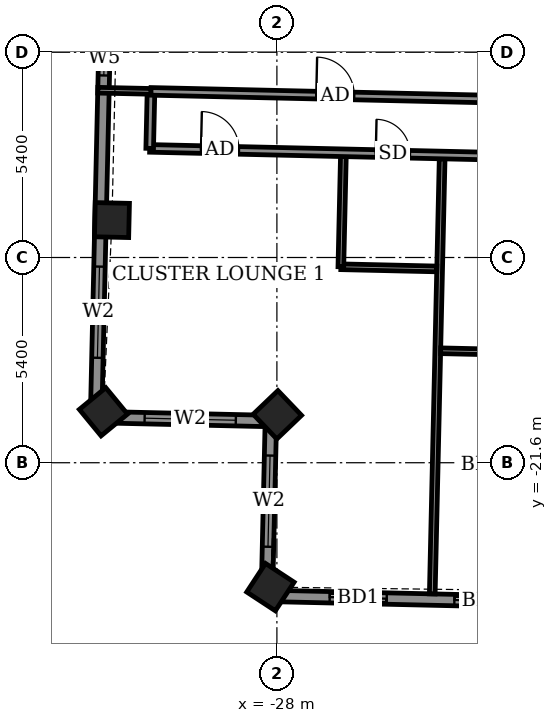
"""IFC4 building model, lengths in metres.
Left out: names, types, materials, properties, quantities, classifications, styles, units other than length and angle.
Written with IfcOpenShell. Run it as: python <this file> out.ifc"""

import sys

from ifc_helpers import new_model, si_unit, direction, frame, frame_2d, origin, origin_2d, place, context, subcontext, project, spatial, rectangle, extrude, element, fill, save


model = new_model("IFC4")
c1 = context("Model", 3, precision=1e-05, world=origin(), true_north=direction((0.0, 1.0)))
c2 = subcontext(c1, "Body", "Model", "MODEL_VIEW")
j1 = project(units=[si_unit("LENGTHUNIT", "METRE"), si_unit("PLANEANGLEUNIT", "RADIAN")], contexts=[c1])
p1 = place(None, origin())
s1 = spatial("IfcSite", under=j1, at=p1, CompositionType="ELEMENT")
p2 = place(p1, origin())
s2 = spatial("IfcBuilding", under=s1, at=p2, CompositionType="ELEMENT")
p3 = place(p2, frame((0.0, 0.0, 306.1)))
s3 = spatial("IfcBuildingStorey", under=s2, at=p3, CompositionType="ELEMENT", Elevation=306.1)
for number, where, z_axis, x_axis in (
    (1, (-32.34, -15.215, -0.55), (0.0, 0.0, 1.0), (-0.023, -1.0, 0.0)),
    (2, (-32.564, -20.259, -0.55), (0.0, 0.0, 1.0), (0.635, -0.772, 0.0)),
    (3, (-27.988, -20.339, -0.55), (0.0, 0.0, 1.0), (0.691, -0.723, 0.0)),
    (4, (-28.17, -24.873, -0.55), (0.0, 0.0, 1.0), (0.836, -0.549, 0.0)),
):
    element("IfcColumn", number, at=place(p3, frame(where, z_axis=z_axis, x_axis=x_axis)), inside=s3, PredefinedType="COLUMN", context=c2, shape_type="SweptSolid", body=[
        extrude(rectangle(XDim=0.9, YDim=0.9, at=origin_2d()), origin(), (0.0, 0.0, 1.0), 3.6),
    ])
p4 = place(p3, frame((-32.388, -4.079, 0.0), z_axis=(0.0, 0.0, 1.0), x_axis=(-0.022673163436, -0.999742930788, 0.0)))
e5 = element("IfcWall", 5, at=p4, inside=s3, PredefinedType="SOLIDWALL", context=c2, shape_type="SweptSolid", body=[
    extrude(rectangle(XDim=16.324, YDim=0.3, at=frame_2d((8.162, 0.0))), origin(), (0.0, 0.0, 1.0), 2.55),
])
p5 = place(p4, frame((1.937, 0.0, 0.0)))
e6 = element("IfcOpeningElement", 6, at=p5, cuts=e5, PredefinedType="OPENING", context=c2, shape_type="SweptSolid", body=[
    extrude(rectangle(XDim=1.5, YDim=2.4, at=frame_2d((0.75, 1.2))), frame((0.0, 0.16, 0.0), z_axis=(0.0, -1.0, 0.0), x_axis=(1.0, 0.0, 0.0)), (0.0, 0.0, 1.0), 0.32),
])
p6 = place(p4, frame((6.433, 0.0, 0.9)))
e7 = element("IfcOpeningElement", 7, at=p6, cuts=e5, PredefinedType="OPENING", context=c2, shape_type="SweptSolid", body=[
    extrude(rectangle(XDim=0.9, YDim=1.5, at=frame_2d((0.45, 0.75))), frame((0.0, 0.16, 0.0), z_axis=(0.0, -1.0, 0.0), x_axis=(1.0, 0.0, 0.0)), (0.0, 0.0, 1.0), 0.32),
])
p7 = place(p4, frame((12.364, 0.0, 0.9)))
e8 = element("IfcOpeningElement", 8, at=p7, cuts=e5, PredefinedType="OPENING", context=c2, shape_type="SweptSolid", body=[
    extrude(rectangle(XDim=2.4, YDim=1.5, at=frame_2d((1.2, 0.75))), frame((0.0, 0.16, 0.0), z_axis=(0.0, -1.0, 0.0), x_axis=(1.0, 0.0, 0.0)), (0.0, 0.0, 1.0), 0.32),
])
p8 = place(p3, frame((-32.758, -20.399, 0.0), z_axis=(0.0, 0.0, 1.0), x_axis=(0.999744404568, -0.02260808559, 0.0)))
e9 = element("IfcWall", 9, at=p8, inside=s3, PredefinedType="SOLIDWALL", context=c2, shape_type="SweptSolid", body=[
    extrude(rectangle(XDim=4.6, YDim=0.3, at=frame_2d((2.3, 0.0))), origin(), (0.0, 0.0, 1.0), 2.55),
])
p9 = place(p8, frame((1.278, 0.0, 0.9)))
e10 = element("IfcOpeningElement", 10, at=p9, cuts=e9, PredefinedType="OPENING", context=c2, shape_type="SweptSolid", body=[
    extrude(rectangle(XDim=2.4, YDim=1.5, at=frame_2d((1.2, 0.75))), frame((0.0, 0.16, 0.0), z_axis=(0.0, -1.0, 0.0), x_axis=(1.0, 0.0, 0.0)), (0.0, 0.0, 1.0), 0.32),
])
p10 = place(p3, frame((-28.159, -20.503, 0.0), z_axis=(0.0, 0.0, 1.0), x_axis=(-0.022820258049, -0.999739584003, 0.0)))
e11 = element("IfcWall", 11, at=p10, inside=s3, PredefinedType="SOLIDWALL", context=c2, shape_type="SweptSolid", body=[
    extrude(rectangle(XDim=4.6, YDim=0.3, at=frame_2d((2.3, 0.0))), origin(), (0.0, 0.0, 1.0), 2.55),
])
p11 = place(p10, frame((0.909, 0.0, 0.9)))
e12 = element("IfcOpeningElement", 12, at=p11, cuts=e11, PredefinedType="OPENING", context=c2, shape_type="SweptSolid", body=[
    extrude(rectangle(XDim=2.4, YDim=1.5, at=frame_2d((1.2, 0.75))), frame((0.0, 0.16, 0.0), z_axis=(0.0, -1.0, 0.0), x_axis=(1.0, 0.0, 0.0)), (0.0, 0.0, 1.0), 0.32),
])
p12 = place(p3, frame((-28.264, -25.102, 0.0), z_axis=(0.0, 0.0, 1.0), x_axis=(0.999742520573, -0.022691244094, 0.0)))
e13 = element("IfcWall", 13, at=p12, inside=s3, PredefinedType="SOLIDWALL", context=c2, shape_type="SweptSolid", body=[
    extrude(rectangle(XDim=51.3, YDim=0.3, at=frame_2d((25.65, 0.0))), origin(), (0.0, 0.0, 1.0), 2.5),
])
p13 = place(p12, frame((1.654, 0.0, 0.0)))
e14 = element("IfcOpeningElement", 14, at=p13, cuts=e13, PredefinedType="OPENING", context=c2, shape_type="SweptSolid", body=[
    extrude(rectangle(XDim=1.5, YDim=2.4, at=frame_2d((0.75, 1.2))), frame((0.0, 0.16, 0.0), z_axis=(0.0, -1.0, 0.0), x_axis=(1.0, 0.0, 0.0)), (0.0, 0.0, 1.0), 0.32),
])
p14 = place(p12, frame((4.936, 0.0, 0.0)))
e15 = element("IfcOpeningElement", 15, at=p14, cuts=e13, PredefinedType="OPENING", context=c2, shape_type="SweptSolid", body=[
    extrude(rectangle(XDim=1.5, YDim=2.4, at=frame_2d((0.75, 1.2))), frame((0.0, 0.16, 0.0), z_axis=(0.0, -1.0, 0.0), x_axis=(1.0, 0.0, 0.0)), (0.0, 0.0, 1.0), 0.32),
])
p15 = place(p12, frame((9.975, 0.0, 0.0)))
e16 = element("IfcOpeningElement", 16, at=p15, cuts=e13, PredefinedType="OPENING", context=c2, shape_type="SweptSolid", body=[
    extrude(rectangle(XDim=1.5, YDim=2.4, at=frame_2d((0.75, 1.2))), frame((0.0, 0.16, 0.0), z_axis=(0.0, -1.0, 0.0), x_axis=(1.0, 0.0, 0.0)), (0.0, 0.0, 1.0), 0.32),
])
p16 = place(p12, frame((15.196, 0.0, 0.0)))
e17 = element("IfcOpeningElement", 17, at=p16, cuts=e13, PredefinedType="OPENING", context=c2, shape_type="SweptSolid", body=[
    extrude(rectangle(XDim=1.5, YDim=2.4, at=frame_2d((0.75, 1.2))), frame((0.0, 0.16, 0.0), z_axis=(0.0, -1.0, 0.0), x_axis=(1.0, 0.0, 0.0)), (0.0, 0.0, 1.0), 0.32),
])
p17 = place(p12, frame((18.5, 0.0, 0.0)))
e18 = element("IfcOpeningElement", 18, at=p17, cuts=e13, PredefinedType="OPENING", context=c2, shape_type="SweptSolid", body=[
    extrude(rectangle(XDim=1.5, YDim=2.4, at=frame_2d((0.75, 1.2))), frame((0.0, 0.16, 0.0), z_axis=(0.0, -1.0, 0.0), x_axis=(1.0, 0.0, 0.0)), (0.0, 0.0, 1.0), 0.32),
])
p18 = place(p12, frame((23.157, 0.0, 0.0)))
e19 = element("IfcOpeningElement", 19, at=p18, cuts=e13, PredefinedType="OPENING", context=c2, shape_type="SweptSolid", body=[
    extrude(rectangle(XDim=1.5, YDim=2.4, at=frame_2d((0.75, 1.2))), frame((0.0, 0.16, 0.0), z_axis=(0.0, -1.0, 0.0), x_axis=(1.0, 0.0, 0.0)), (0.0, 0.0, 1.0), 0.32),
])
p19 = place(p12, frame((26.643, 0.0, 0.0)))
e20 = element("IfcOpeningElement", 20, at=p19, cuts=e13, PredefinedType="OPENING", context=c2, shape_type="SweptSolid", body=[
    extrude(rectangle(XDim=1.5, YDim=2.4, at=frame_2d((0.75, 1.2))), frame((0.0, 0.16, 0.0), z_axis=(0.0, -1.0, 0.0), x_axis=(1.0, 0.0, 0.0)), (0.0, 0.0, 1.0), 0.32),
])
p20 = place(p12, frame((31.275, 0.0, 0.0)))
e21 = element("IfcOpeningElement", 21, at=p20, cuts=e13, PredefinedType="OPENING", context=c2, shape_type="SweptSolid", body=[
    extrude(rectangle(XDim=1.5, YDim=2.4, at=frame_2d((0.75, 1.2))), frame((0.0, 0.16, 0.0), z_axis=(0.0, -1.0, 0.0), x_axis=(1.0, 0.0, 0.0)), (0.0, 0.0, 1.0), 0.32),
])
p21 = place(p12, frame((34.578, 0.0, 0.0)))
e22 = element("IfcOpeningElement", 22, at=p21, cuts=e13, PredefinedType="OPENING", context=c2, shape_type="SweptSolid", body=[
    extrude(rectangle(XDim=1.5, YDim=2.4, at=frame_2d((0.75, 1.2))), frame((0.0, 0.16, 0.0), z_axis=(0.0, -1.0, 0.0), x_axis=(1.0, 0.0, 0.0)), (0.0, 0.0, 1.0), 0.32),
])
p22 = place(p12, frame((39.75, 0.0, 0.0)))
e23 = element("IfcOpeningElement", 23, at=p22, cuts=e13, PredefinedType="OPENING", context=c2, shape_type="SweptSolid", body=[
    extrude(rectangle(XDim=1.5, YDim=2.4, at=frame_2d((0.75, 1.2))), frame((0.0, 0.16, 0.0), z_axis=(0.0, -1.0, 0.0), x_axis=(1.0, 0.0, 0.0)), (0.0, 0.0, 1.0), 0.32),
])
p23 = place(p12, frame((44.839, 0.0, 0.0)))
e24 = element("IfcOpeningElement", 24, at=p23, cuts=e13, PredefinedType="OPENING", context=c2, shape_type="SweptSolid", body=[
    extrude(rectangle(XDim=1.5, YDim=2.4, at=frame_2d((0.75, 1.2))), frame((0.0, 0.16, 0.0), z_axis=(0.0, -1.0, 0.0), x_axis=(1.0, 0.0, 0.0)), (0.0, 0.0, 1.0), 0.32),
])
p24 = place(p12, frame((47.628, 0.0, 0.9)))
e25 = element("IfcOpeningElement", 25, at=p24, cuts=e13, PredefinedType="OPENING", context=c2, shape_type="SweptSolid", body=[
    extrude(rectangle(XDim=2.4, YDim=1.5, at=frame_2d((1.2, 0.75))), frame((0.0, 0.16, 0.0), z_axis=(0.0, -1.0, 0.0), x_axis=(1.0, 0.0, 0.0)), (0.0, 0.0, 1.0), 0.32),
])
p25 = place(p3, frame((-23.912, -25.051, 0.0), z_axis=(0.0, 0.0, 1.0), x_axis=(0.022708327922, 0.999742132674, 0.0)))
e26 = element("IfcWall", 26, at=p25, inside=s3, PredefinedType="PARTITIONING", context=c2, shape_type="SweptSolid", body=[
    extrude(rectangle(XDim=11.45, YDim=0.15, at=frame_2d((5.725, 0.0))), origin(), (0.0, 0.0, 1.0), 2.5),
])
p26 = place(p3, frame((-23.691, -18.654, 0.0), z_axis=(0.0, 0.0, 1.0), x_axis=(0.999740260747, -0.02279059109, 0.0)))
e27 = element("IfcWall", 27, at=p26, inside=s3, PredefinedType="PARTITIONING", context=c2, shape_type="SweptSolid", body=[
    extrude(rectangle(XDim=2.324, YDim=0.15, at=frame_2d((1.162, 0.0))), origin(), (0.0, 0.0, 1.0), 3.05),
])
p27 = place(p3, frame((-26.317, -16.444, 0.0), z_axis=(0.0, 0.0, 1.0), x_axis=(0.9997461113, -0.022532486354, 0.0)))
e28 = element("IfcWall", 28, at=p27, inside=s3, PredefinedType="PARTITIONING", context=c2, shape_type="SweptSolid", body=[
    extrude(rectangle(XDim=2.525, YDim=0.15, at=frame_2d((1.262, 0.0))), origin(), (0.0, 0.0, 1.0), 3.05),
])
p28 = place(p3, frame((-26.317, -16.444, 0.0), z_axis=(0.0, 0.0, 1.0), x_axis=(0.022730967319, 0.999741618182, 0.0)))
e29 = element("IfcWall", 29, at=p28, inside=s3, PredefinedType="PARTITIONING", context=c2, shape_type="SweptSolid", body=[
    extrude(rectangle(XDim=2.9, YDim=0.15, at=frame_2d((1.45, 0.0))), origin(), (0.0, 0.0, 1.0), 3.05),
])
p29 = place(p3, frame((-31.347, -13.329, 0.0), z_axis=(0.0, 0.0, 1.0), x_axis=(0.999742613079, -0.022687168058, 0.0)))
e30 = element("IfcWall", 30, at=p29, inside=s3, PredefinedType="PARTITIONING", context=c2, shape_type="SweptSolid", body=[
    extrude(rectangle(XDim=58.799, YDim=0.2, at=frame_2d((29.399, 0.0))), origin(), (0.0, 0.0, 1.0), 3.05),
])
p30 = place(p29, frame((1.35, 0.0, 0.0)))
e31 = element("IfcOpeningElement", 31, at=p30, cuts=e30, PredefinedType="OPENING", context=c2, shape_type="SweptSolid", body=[
    extrude(rectangle(XDim=1.0, YDim=2.1, at=frame_2d((0.5, 1.05))), frame((0.0, 0.11, 0.0), z_axis=(0.0, -1.0, 0.0), x_axis=(1.0, 0.0, 0.0)), (0.0, 0.0, 1.0), 0.22),
])
p31 = place(p29, frame((5.95, 0.0, 0.0)))
e32 = element("IfcOpeningElement", 32, at=p31, cuts=e30, PredefinedType="OPENING", context=c2, shape_type="SweptSolid", body=[
    extrude(rectangle(XDim=0.9, YDim=2.1, at=frame_2d((0.45, 1.05))), frame((0.0, 0.11, 0.0), z_axis=(0.0, -1.0, 0.0), x_axis=(1.0, 0.0, 0.0)), (0.0, 0.0, 1.0), 0.22),
])
p32 = place(p29, frame((10.575, 0.0, 0.0)))
e33 = element("IfcOpeningElement", 33, at=p32, cuts=e30, PredefinedType="OPENING", context=c2, shape_type="SweptSolid", body=[
    extrude(rectangle(XDim=0.9, YDim=2.1, at=frame_2d((0.45, 1.05))), frame((0.0, 0.11, 0.0), z_axis=(0.0, -1.0, 0.0), x_axis=(1.0, 0.0, 0.0)), (0.0, 0.0, 1.0), 0.22),
])
p33 = place(p29, frame((12.425, 0.0, 0.0)))
e34 = element("IfcOpeningElement", 34, at=p33, cuts=e30, PredefinedType="OPENING", context=c2, shape_type="SweptSolid", body=[
    extrude(rectangle(XDim=0.9, YDim=2.1, at=frame_2d((0.45, 1.05))), frame((0.0, 0.11, 0.0), z_axis=(0.0, -1.0, 0.0), x_axis=(1.0, 0.0, 0.0)), (0.0, 0.0, 1.0), 0.22),
])
p34 = place(p29, frame((19.075, 0.0, 0.0)))
e35 = element("IfcOpeningElement", 35, at=p34, cuts=e30, PredefinedType="OPENING", context=c2, shape_type="SweptSolid", body=[
    extrude(rectangle(XDim=0.9, YDim=2.1, at=frame_2d((0.45, 1.05))), frame((0.0, 0.11, 0.0), z_axis=(0.0, -1.0, 0.0), x_axis=(1.0, 0.0, 0.0)), (0.0, 0.0, 1.0), 0.22),
])
p35 = place(p29, frame((20.95, 0.0, 0.0)))
e36 = element("IfcOpeningElement", 36, at=p35, cuts=e30, PredefinedType="OPENING", context=c2, shape_type="SweptSolid", body=[
    extrude(rectangle(XDim=0.9, YDim=2.1, at=frame_2d((0.45, 1.05))), frame((0.0, 0.11, 0.0), z_axis=(0.0, -1.0, 0.0), x_axis=(1.0, 0.0, 0.0)), (0.0, 0.0, 1.0), 0.22),
])
p36 = place(p29, frame((27.625, 0.0, 0.0)))
e37 = element("IfcOpeningElement", 37, at=p36, cuts=e30, PredefinedType="OPENING", context=c2, shape_type="SweptSolid", body=[
    extrude(rectangle(XDim=0.9, YDim=2.1, at=frame_2d((0.45, 1.05))), frame((0.0, 0.11, 0.0), z_axis=(0.0, -1.0, 0.0), x_axis=(1.0, 0.0, 0.0)), (0.0, 0.0, 1.0), 0.22),
])
p37 = place(p29, frame((29.475, 0.0, 0.0)))
e38 = element("IfcOpeningElement", 38, at=p37, cuts=e30, PredefinedType="OPENING", context=c2, shape_type="SweptSolid", body=[
    extrude(rectangle(XDim=0.9, YDim=2.1, at=frame_2d((0.45, 1.05))), frame((0.0, 0.11, 0.0), z_axis=(0.0, -1.0, 0.0), x_axis=(1.0, 0.0, 0.0)), (0.0, 0.0, 1.0), 0.22),
])
p38 = place(p29, frame((36.125, 0.0, 0.0)))
e39 = element("IfcOpeningElement", 39, at=p38, cuts=e30, PredefinedType="OPENING", context=c2, shape_type="SweptSolid", body=[
    extrude(rectangle(XDim=0.9, YDim=2.1, at=frame_2d((0.45, 1.05))), frame((0.0, 0.11, 0.0), z_axis=(0.0, -1.0, 0.0), x_axis=(1.0, 0.0, 0.0)), (0.0, 0.0, 1.0), 0.22),
])
p39 = place(p29, frame((37.95, 0.0, 0.0)))
e40 = element("IfcOpeningElement", 40, at=p39, cuts=e30, PredefinedType="OPENING", context=c2, shape_type="SweptSolid", body=[
    extrude(rectangle(XDim=0.9, YDim=2.1, at=frame_2d((0.45, 1.05))), frame((0.0, 0.11, 0.0), z_axis=(0.0, -1.0, 0.0), x_axis=(1.0, 0.0, 0.0)), (0.0, 0.0, 1.0), 0.22),
])
p40 = place(p29, frame((44.6, 0.0, 0.0)))
e41 = element("IfcOpeningElement", 41, at=p40, cuts=e30, PredefinedType="OPENING", context=c2, shape_type="SweptSolid", body=[
    extrude(rectangle(XDim=0.9, YDim=2.1, at=frame_2d((0.45, 1.05))), frame((0.0, 0.11, 0.0), z_axis=(0.0, -1.0, 0.0), x_axis=(1.0, 0.0, 0.0)), (0.0, 0.0, 1.0), 0.22),
])
p41 = place(p29, frame((46.475, 0.0, 0.0)))
e42 = element("IfcOpeningElement", 42, at=p41, cuts=e30, PredefinedType="OPENING", context=c2, shape_type="SweptSolid", body=[
    extrude(rectangle(XDim=0.9, YDim=2.1, at=frame_2d((0.45, 1.05))), frame((0.0, 0.11, 0.0), z_axis=(0.0, -1.0, 0.0), x_axis=(1.0, 0.0, 0.0)), (0.0, 0.0, 1.0), 0.22),
])
p42 = place(p29, frame((55.925, 0.0, 0.0)))
e43 = element("IfcOpeningElement", 43, at=p42, cuts=e30, PredefinedType="OPENING", context=c2, shape_type="SweptSolid", body=[
    extrude(rectangle(XDim=1.0, YDim=2.1, at=frame_2d((0.5, 1.05))), frame((0.0, 0.11, 0.0), z_axis=(0.0, -1.0, 0.0), x_axis=(1.0, 0.0, 0.0)), (0.0, 0.0, 1.0), 0.22),
])
p43 = place(p29, frame((51.0, 0.0, 0.0)))
e44 = element("IfcOpeningElement", 44, at=p43, cuts=e30, PredefinedType="OPENING", context=c2, shape_type="SweptSolid", body=[
    extrude(rectangle(XDim=0.9, YDim=2.1, at=frame_2d((0.45, 1.05))), frame((0.0, 0.11, 0.0), z_axis=(0.0, -1.0, 0.0), x_axis=(1.0, 0.0, 0.0)), (0.0, 0.0, 1.0), 0.22),
])
p44 = place(p3, frame((-31.347, -13.329, 0.0), z_axis=(0.0, 0.0, 1.0), x_axis=(0.022617910375, 0.999744182344, 0.0)))
e45 = element("IfcWall", 45, at=p44, inside=s3, PredefinedType="PARTITIONING", context=c2, shape_type="SweptSolid", body=[
    extrude(rectangle(XDim=1.5, YDim=0.2, at=frame_2d((0.75, 0.0))), origin(), (0.0, 0.0, 1.0), 3.05),
])
p45 = place(p3, frame((-32.713, -11.798, 0.0), z_axis=(0.0, 0.0, 1.0), x_axis=(0.999756172383, -0.022081571112, 0.0)))
e46 = element("IfcWall", 46, at=p45, inside=s3, PredefinedType="PARTITIONING", context=c2, shape_type="SweptSolid", body=[
    extrude(rectangle(XDim=1.404, YDim=0.15, at=frame_2d((0.702, 0.0))), origin(), (0.0, 0.0, 1.0), 2.55),
])
p46 = place(p3, frame((-31.313, -11.829, 0.0), z_axis=(0.0, 0.0, 1.0), x_axis=(0.999742346277, -0.022698921993, 0.0)))
e47 = element("IfcWall", 47, at=p46, inside=s3, PredefinedType="PARTITIONING", context=c2, shape_type="SweptSolid", body=[
    extrude(rectangle(XDim=11.1, YDim=0.2, at=frame_2d((5.55, 0.0))), origin(), (0.0, 0.0, 1.0), 3.05),
])
p47 = place(p46, frame((4.35, 0.0, 0.0)))
e48 = element("IfcOpeningElement", 48, at=p47, cuts=e47, PredefinedType="OPENING", context=c2, shape_type="SweptSolid", body=[
    extrude(rectangle(XDim=1.0, YDim=2.1, at=frame_2d((0.5, 1.05))), frame((0.0, 0.11, 0.0), z_axis=(0.0, -1.0, 0.0), x_axis=(1.0, 0.0, 0.0)), (0.0, 0.0, 1.0), 0.22),
])
p48 = place(p6, origin())
e49 = element("IfcWindow", 49, at=p48, inside=s3, PartitioningType="SINGLE_PANEL", PredefinedType="WINDOW", context=c2, shape_type="SweptSolid", body=[
    extrude(rectangle(XDim=0.9, YDim=1.5, at=frame_2d((0.45, 0.75))), frame((0.0, 0.03, 0.0), z_axis=(0.0, -1.0, 0.0), x_axis=(1.0, 0.0, 0.0)), (0.0, 0.0, 1.0), 0.06),
])
fill(e7, e49)
p49 = place(p7, origin())
e50 = element("IfcWindow", 50, at=p49, inside=s3, PartitioningType="DOUBLE_PANEL_VERTICAL", PredefinedType="WINDOW", context=c2, shape_type="SweptSolid", body=[
    extrude(rectangle(XDim=2.4, YDim=1.5, at=frame_2d((1.2, 0.75))), frame((0.0, 0.03, 0.0), z_axis=(0.0, -1.0, 0.0), x_axis=(1.0, 0.0, 0.0)), (0.0, 0.0, 1.0), 0.06),
])
fill(e8, e50)
p50 = place(p9, origin())
e51 = element("IfcWindow", 51, at=p50, inside=s3, PartitioningType="DOUBLE_PANEL_VERTICAL", PredefinedType="WINDOW", context=c2, shape_type="SweptSolid", body=[
    extrude(rectangle(XDim=2.4, YDim=1.5, at=frame_2d((1.2, 0.75))), frame((0.0, 0.03, 0.0), z_axis=(0.0, -1.0, 0.0), x_axis=(1.0, 0.0, 0.0)), (0.0, 0.0, 1.0), 0.06),
])
fill(e10, e51)
p51 = place(p11, origin())
e52 = element("IfcWindow", 52, at=p51, inside=s3, PartitioningType="DOUBLE_PANEL_VERTICAL", PredefinedType="WINDOW", context=c2, shape_type="SweptSolid", body=[
    extrude(rectangle(XDim=2.4, YDim=1.5, at=frame_2d((1.2, 0.75))), frame((0.0, 0.03, 0.0), z_axis=(0.0, -1.0, 0.0), x_axis=(1.0, 0.0, 0.0)), (0.0, 0.0, 1.0), 0.06),
])
fill(e12, e52)
p52 = place(p13, origin())
e53 = element("IfcDoor", 53, at=p52, inside=s3, OperationType="SLIDING_TO_LEFT", PredefinedType="DOOR", context=c2, shape_type="SweptSolid", body=[
    extrude(rectangle(XDim=1.5, YDim=2.4, at=frame_2d((0.75, 1.2))), frame((0.0, 0.025, 0.0), z_axis=(0.0, -1.0, 0.0), x_axis=(1.0, 0.0, 0.0)), (0.0, 0.0, 1.0), 0.05),
])
fill(e14, e53)
p53 = place(p14, origin())
e54 = element("IfcDoor", 54, at=p53, inside=s3, OperationType="SLIDING_TO_LEFT", PredefinedType="DOOR", context=c2, shape_type="SweptSolid", body=[
    extrude(rectangle(XDim=1.5, YDim=2.4, at=frame_2d((0.75, 1.2))), frame((0.0, 0.025, 0.0), z_axis=(0.0, -1.0, 0.0), x_axis=(1.0, 0.0, 0.0)), (0.0, 0.0, 1.0), 0.05),
])
fill(e15, e54)
p54 = place(p30, origin())
e55 = element("IfcDoor", 55, at=p54, inside=s3, OperationType="SINGLE_SWING_LEFT", PredefinedType="DOOR", context=c2, shape_type="SweptSolid", body=[
    extrude(rectangle(XDim=1.0, YDim=2.1, at=frame_2d((0.5, 1.05))), frame((0.0, 0.025, 0.0), z_axis=(0.0, -1.0, 0.0), x_axis=(1.0, 0.0, 0.0)), (0.0, 0.0, 1.0), 0.05),
])
fill(e31, e55)
p55 = place(p31, origin())
e56 = element("IfcDoor", 56, at=p55, inside=s3, OperationType="SINGLE_SWING_LEFT", PredefinedType="DOOR", context=c2, shape_type="SweptSolid", body=[
    extrude(rectangle(XDim=0.9, YDim=2.1, at=frame_2d((0.45, 1.05))), frame((0.0, 0.025, 0.0), z_axis=(0.0, -1.0, 0.0), x_axis=(1.0, 0.0, 0.0)), (0.0, 0.0, 1.0), 0.05),
])
fill(e32, e56)
p56 = place(p47, origin())
e57 = element("IfcDoor", 57, at=p56, inside=s3, OperationType="SINGLE_SWING_LEFT", PredefinedType="DOOR", context=c2, shape_type="SweptSolid", body=[
    extrude(rectangle(XDim=1.0, YDim=2.1, at=frame_2d((0.5, 1.05))), frame((0.0, 0.025, 0.0), z_axis=(0.0, -1.0, 0.0), x_axis=(1.0, 0.0, 0.0)), (0.0, 0.0, 1.0), 0.05),
])
fill(e48, e57)
save(model, sys.argv[1])
